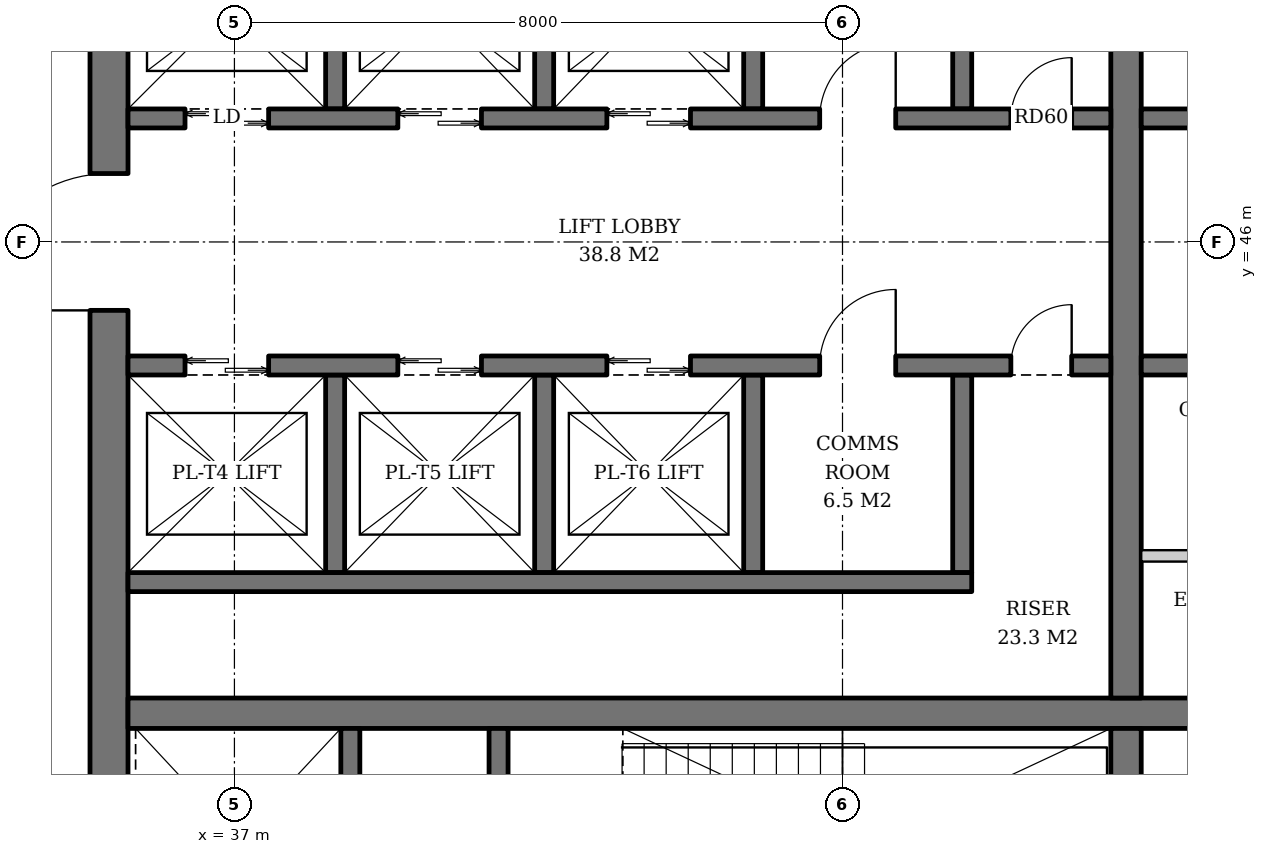
"""IFC4 building model, lengths in metres.
Left out: names, types, materials, properties, quantities, classifications, styles, units other than length and angle.
Written with IfcOpenShell. Run it as: python <this file> out.ifc"""

import sys

from ifc_helpers import new_model, si_unit, direction, frame, frame_2d, origin, place, context, subcontext, project, spatial, rectangle, extrude, element, fill, save


model = new_model("IFC4")
c1 = context("Model", 3, precision=1e-05, world=origin(), true_north=direction((0.0, 1.0)))
c2 = subcontext(c1, "Body", "Model", "MODEL_VIEW")
j1 = project(units=[si_unit("LENGTHUNIT", "METRE"), si_unit("PLANEANGLEUNIT", "RADIAN")], contexts=[c1])
p1 = place(None, origin())
s1 = spatial("IfcSite", under=j1, at=p1, CompositionType="ELEMENT")
p2 = place(p1, origin())
s2 = spatial("IfcBuilding", under=s1, at=p2, CompositionType="ELEMENT")
p3 = place(p2, frame((0.0, 0.0, 249.0)))
s3 = spatial("IfcBuildingStorey", under=s2, at=p3, CompositionType="ELEMENT", Elevation=249.0)
p4 = place(p3, frame((35.35, 36.6, 0.0), z_axis=(0.0, 0.0, 1.0), x_axis=(0.0, 1.0, 0.0)))
e1 = element("IfcWall", 1, at=p4, inside=s3, PredefinedType="SHEAR", context=c2, shape_type="SweptSolid", body=[
    extrude(rectangle(XDim=18.8, YDim=0.5, at=frame_2d((9.4, 0.0))), origin(), (0.0, 0.0, 1.0), 3.8),
])
p5 = place(p4, frame((8.5, 0.0, 0.0)))
e2 = element("IfcOpeningElement", 2, at=p5, cuts=e1, PredefinedType="OPENING", context=c2, shape_type="SweptSolid", body=[
    extrude(rectangle(XDim=1.8, YDim=2.4, at=frame_2d((0.9, 1.2))), frame((0.0, 0.26, 0.0), z_axis=(0.0, -1.0, 0.0), x_axis=(1.0, 0.0, 0.0)), (0.0, 0.0, 1.0), 0.52),
])
p6 = place(p3, frame((35.6, 39.8, 0.0), z_axis=(0.0, 0.0, 1.0), x_axis=(1.0, 0.0, 0.0)))
e3 = element("IfcWall", 3, at=p6, inside=s3, PredefinedType="SHEAR", context=c2, shape_type="SweptSolid", body=[
    extrude(rectangle(XDim=18.8, YDim=0.4, at=frame_2d((9.4, 0.0))), origin(), (0.0, 0.0, 1.0), 3.8),
])
p7 = place(p3, frame((48.73, 36.6, 0.0), z_axis=(0.0, 0.0, 1.0), x_axis=(0.0, 1.0, 0.0)))
e4 = element("IfcWall", 4, at=p7, inside=s3, PredefinedType="SHEAR", context=c2, shape_type="SweptSolid", body=[
    extrude(rectangle(XDim=3.0, YDim=0.4, at=frame_2d((1.5, 0.0))), origin(), (0.0, 0.0, 1.0), 3.8),
])
p8 = place(p3, frame((48.73, 40.0, 0.0), z_axis=(0.0, 0.0, 1.0), x_axis=(0.0, 1.0, 0.0)))
e5 = element("IfcWall", 5, at=p8, inside=s3, PredefinedType="SHEAR", context=c2, shape_type="SweptSolid", body=[
    extrude(rectangle(XDim=12.0, YDim=0.4, at=frame_2d((6.0, 0.0))), origin(), (0.0, 0.0, 1.0), 3.8),
])
p9 = place(p3, frame((38.525, 36.6, 0.0), z_axis=(0.0, 0.0, 1.0), x_axis=(0.0, 1.0, 0.0)))
e6 = element("IfcWall", 6, at=p9, inside=s3, PredefinedType="SHEAR", context=c2, shape_type="SweptSolid", body=[
    extrude(rectangle(XDim=3.0, YDim=0.25, at=frame_2d((1.5, 0.0))), origin(), (0.0, 0.0, 1.0), 3.8),
])
p10 = place(p9, frame((0.9, 0.0, 0.0)))
e7 = element("IfcOpeningElement", 7, at=p10, cuts=e6, PredefinedType="OPENING", context=c2, shape_type="SweptSolid", body=[
    extrude(rectangle(XDim=1.3, YDim=2.2, at=frame_2d((0.65, 1.1))), frame((0.0, 0.135, 0.0), z_axis=(0.0, -1.0, 0.0), x_axis=(1.0, 0.0, 0.0)), (0.0, 0.0, 1.0), 0.27),
])
p11 = place(p3, frame((40.475, 36.6, 0.0), z_axis=(0.0, 0.0, 1.0), x_axis=(0.0, 1.0, 0.0)))
e8 = element("IfcWall", 8, at=p11, inside=s3, PredefinedType="SHEAR", context=c2, shape_type="SweptSolid", body=[
    extrude(rectangle(XDim=3.0, YDim=0.25, at=frame_2d((1.5, 0.0))), origin(), (0.0, 0.0, 1.0), 3.8),
])
p12 = place(p11, frame((0.85, 0.0, 0.0)))
e9 = element("IfcOpeningElement", 9, at=p12, cuts=e8, PredefinedType="OPENING", context=c2, shape_type="SweptSolid", body=[
    extrude(rectangle(XDim=1.2, YDim=2.1, at=frame_2d((0.6, 1.05))), frame((0.0, 0.135, 0.0), z_axis=(0.0, -1.0, 0.0), x_axis=(1.0, 0.0, 0.0)), (0.0, 0.0, 1.0), 0.27),
])
for number, where, z_axis, x_axis in (
    (10, (38.325, 47.75, 0.0), (0.0, 0.0, 1.0), (0.0, 1.0, 0.0)),
    (11, (41.075, 47.75, 0.0), (0.0, 0.0, 1.0), (0.0, 1.0, 0.0)),
    (12, (43.825, 47.75, 0.0), (0.0, 0.0, 1.0), (0.0, 1.0, 0.0)),
    (13, (46.575, 47.75, 0.0), (0.0, 0.0, 1.0), (0.0, 1.0, 0.0)),
):
    element("IfcWall", number, at=place(p3, frame(where, z_axis=z_axis, x_axis=x_axis)), inside=s3, PredefinedType="SHEAR", context=c2, shape_type="SweptSolid", body=[
        extrude(rectangle(XDim=2.6, YDim=0.25, at=frame_2d((1.3, 0.0))), origin(), (0.0, 0.0, 1.0), 3.8),
    ])
p13 = place(p3, frame((35.6, 47.625, 0.0), z_axis=(0.0, 0.0, 1.0), x_axis=(1.0, 0.0, 0.0)))
e14 = element("IfcWall", 14, at=p13, inside=s3, PredefinedType="SHEAR", context=c2, shape_type="SweptSolid", body=[
    extrude(rectangle(XDim=12.93, YDim=0.25, at=frame_2d((6.465, 0.0))), origin(), (0.0, 0.0, 1.0), 3.8),
])
p14 = place(p13, frame((0.75, 0.0, 0.0)))
e15 = element("IfcOpeningElement", 15, at=p14, cuts=e14, PredefinedType="OPENING", context=c2, shape_type="SweptSolid", body=[
    extrude(rectangle(XDim=1.1, YDim=2.2, at=frame_2d((0.55, 1.1))), frame((0.0, 0.135, 0.0), z_axis=(0.0, -1.0, 0.0), x_axis=(1.0, 0.0, 0.0)), (0.0, 0.0, 1.0), 0.27),
])
p15 = place(p13, frame((3.55, 0.0, 0.0)))
e16 = element("IfcOpeningElement", 16, at=p15, cuts=e14, PredefinedType="OPENING", context=c2, shape_type="SweptSolid", body=[
    extrude(rectangle(XDim=1.1, YDim=2.2, at=frame_2d((0.55, 1.1))), frame((0.0, 0.135, 0.0), z_axis=(0.0, -1.0, 0.0), x_axis=(1.0, 0.0, 0.0)), (0.0, 0.0, 1.0), 0.27),
])
p16 = place(p13, frame((6.3, 0.0, 0.0)))
e17 = element("IfcOpeningElement", 17, at=p16, cuts=e14, PredefinedType="OPENING", context=c2, shape_type="SweptSolid", body=[
    extrude(rectangle(XDim=1.1, YDim=2.2, at=frame_2d((0.55, 1.1))), frame((0.0, 0.135, 0.0), z_axis=(0.0, -1.0, 0.0), x_axis=(1.0, 0.0, 0.0)), (0.0, 0.0, 1.0), 0.27),
])
p17 = place(p13, frame((9.1, 0.0, 0.0)))
e18 = element("IfcOpeningElement", 18, at=p17, cuts=e14, PredefinedType="OPENING", context=c2, shape_type="SweptSolid", body=[
    extrude(rectangle(XDim=1.0, YDim=2.1, at=frame_2d((0.5, 1.05))), frame((0.0, 0.135, 0.0), z_axis=(0.0, -1.0, 0.0), x_axis=(1.0, 0.0, 0.0)), (0.0, 0.0, 1.0), 0.27),
])
p18 = place(p13, frame((11.615, 0.0, 0.0)))
e19 = element("IfcOpeningElement", 19, at=p18, cuts=e14, PredefinedType="OPENING", context=c2, shape_type="SweptSolid", body=[
    extrude(rectangle(XDim=0.8, YDim=2.0, at=frame_2d((0.4, 1.0))), frame((0.0, 0.135, 0.0), z_axis=(0.0, -1.0, 0.0), x_axis=(1.0, 0.0, 0.0)), (0.0, 0.0, 1.0), 0.27),
])
for number, where, z_axis, x_axis in (
    (20, (38.325, 44.25, 0.0), (0.0, 0.0, 1.0), (0.0, -1.0, 0.0)),
    (21, (41.075, 44.25, 0.0), (0.0, 0.0, 1.0), (0.0, -1.0, 0.0)),
    (22, (43.825, 44.25, 0.0), (0.0, 0.0, 1.0), (0.0, -1.0, 0.0)),
    (23, (46.575, 44.25, 0.0), (0.0, 0.0, 1.0), (0.0, -1.0, 0.0)),
):
    element("IfcWall", number, at=place(p3, frame(where, z_axis=z_axis, x_axis=x_axis)), inside=s3, PredefinedType="SHEAR", context=c2, shape_type="SweptSolid", body=[
        extrude(rectangle(XDim=2.6, YDim=0.25, at=frame_2d((1.3, 0.0))), origin(), (0.0, 0.0, 1.0), 3.8),
    ])
p19 = place(p3, frame((35.6, 41.525, 0.0), z_axis=(0.0, 0.0, 1.0), x_axis=(1.0, 0.0, 0.0)))
e24 = element("IfcWall", 24, at=p19, inside=s3, PredefinedType="SHEAR", context=c2, shape_type="SweptSolid", body=[
    extrude(rectangle(XDim=11.1, YDim=0.25, at=frame_2d((5.55, 0.0))), origin(), (0.0, 0.0, 1.0), 3.8),
])
p20 = place(p3, frame((35.6, 44.375, 0.0), z_axis=(0.0, 0.0, 1.0), x_axis=(1.0, 0.0, 0.0)))
e25 = element("IfcWall", 25, at=p20, inside=s3, PredefinedType="SHEAR", context=c2, shape_type="SweptSolid", body=[
    extrude(rectangle(XDim=12.93, YDim=0.25, at=frame_2d((6.465, 0.0))), origin(), (0.0, 0.0, 1.0), 3.8),
])
p21 = place(p20, frame((0.75, 0.0, 0.0)))
e26 = element("IfcOpeningElement", 26, at=p21, cuts=e25, PredefinedType="OPENING", context=c2, shape_type="SweptSolid", body=[
    extrude(rectangle(XDim=1.1, YDim=2.2, at=frame_2d((0.55, 1.1))), frame((0.0, 0.135, 0.0), z_axis=(0.0, -1.0, 0.0), x_axis=(1.0, 0.0, 0.0)), (0.0, 0.0, 1.0), 0.27),
])
p22 = place(p20, frame((3.55, 0.0, 0.0)))
e27 = element("IfcOpeningElement", 27, at=p22, cuts=e25, PredefinedType="OPENING", context=c2, shape_type="SweptSolid", body=[
    extrude(rectangle(XDim=1.1, YDim=2.2, at=frame_2d((0.55, 1.1))), frame((0.0, 0.135, 0.0), z_axis=(0.0, -1.0, 0.0), x_axis=(1.0, 0.0, 0.0)), (0.0, 0.0, 1.0), 0.27),
])
p23 = place(p20, frame((6.3, 0.0, 0.0)))
e28 = element("IfcOpeningElement", 28, at=p23, cuts=e25, PredefinedType="OPENING", context=c2, shape_type="SweptSolid", body=[
    extrude(rectangle(XDim=1.1, YDim=2.2, at=frame_2d((0.55, 1.1))), frame((0.0, 0.135, 0.0), z_axis=(0.0, -1.0, 0.0), x_axis=(1.0, 0.0, 0.0)), (0.0, 0.0, 1.0), 0.27),
])
p24 = place(p20, frame((9.1, 0.0, 0.0)))
e29 = element("IfcOpeningElement", 29, at=p24, cuts=e25, PredefinedType="OPENING", context=c2, shape_type="SweptSolid", body=[
    extrude(rectangle(XDim=1.0, YDim=2.1, at=frame_2d((0.5, 1.05))), frame((0.0, 0.135, 0.0), z_axis=(0.0, -1.0, 0.0), x_axis=(1.0, 0.0, 0.0)), (0.0, 0.0, 1.0), 0.27),
])
p25 = place(p20, frame((11.615, 0.0, 0.0)))
e30 = element("IfcOpeningElement", 30, at=p25, cuts=e25, PredefinedType="OPENING", context=c2, shape_type="SweptSolid", body=[
    extrude(rectangle(XDim=0.8, YDim=2.0, at=frame_2d((0.4, 1.0))), frame((0.0, 0.135, 0.0), z_axis=(0.0, -1.0, 0.0), x_axis=(1.0, 0.0, 0.0)), (0.0, 0.0, 1.0), 0.27),
])
p26 = place(p3, frame((48.93, 47.625, 0.0), z_axis=(0.0, 0.0, 1.0), x_axis=(1.0, 0.0, 0.0)))
e31 = element("IfcWall", 31, at=p26, inside=s3, PredefinedType="SHEAR", context=c2, shape_type="SweptSolid", body=[
    extrude(rectangle(XDim=5.47, YDim=0.25, at=frame_2d((2.735, 0.0))), origin(), (0.0, 0.0, 1.0), 3.8),
])
p27 = place(p26, frame((0.78, 0.0, 0.0)))
e32 = element("IfcOpeningElement", 32, at=p27, cuts=e31, PredefinedType="OPENING", context=c2, shape_type="SweptSolid", body=[
    extrude(rectangle(XDim=1.0, YDim=2.1, at=frame_2d((0.5, 1.05))), frame((0.0, 0.135, 0.0), z_axis=(0.0, -1.0, 0.0), x_axis=(1.0, 0.0, 0.0)), (0.0, 0.0, 1.0), 0.27),
])
p28 = place(p26, frame((3.64, 0.0, 0.0)))
e33 = element("IfcOpeningElement", 33, at=p28, cuts=e31, PredefinedType="OPENING", context=c2, shape_type="SweptSolid", body=[
    extrude(rectangle(XDim=1.0, YDim=2.1, at=frame_2d((0.5, 1.05))), frame((0.0, 0.135, 0.0), z_axis=(0.0, -1.0, 0.0), x_axis=(1.0, 0.0, 0.0)), (0.0, 0.0, 1.0), 0.27),
])
p29 = place(p3, frame((48.93, 44.375, 0.0), z_axis=(0.0, 0.0, 1.0), x_axis=(1.0, 0.0, 0.0)))
e34 = element("IfcWall", 34, at=p29, inside=s3, PredefinedType="SHEAR", context=c2, shape_type="SweptSolid", body=[
    extrude(rectangle(XDim=5.47, YDim=0.25, at=frame_2d((2.735, 0.0))), origin(), (0.0, 0.0, 1.0), 3.8),
])
p30 = place(p29, frame((0.78, 0.0, 0.0)))
e35 = element("IfcOpeningElement", 35, at=p30, cuts=e34, PredefinedType="OPENING", context=c2, shape_type="SweptSolid", body=[
    extrude(rectangle(XDim=1.0, YDim=2.1, at=frame_2d((0.5, 1.05))), frame((0.0, 0.135, 0.0), z_axis=(0.0, -1.0, 0.0), x_axis=(1.0, 0.0, 0.0)), (0.0, 0.0, 1.0), 0.27),
])
p31 = place(p29, frame((3.64, 0.0, 0.0)))
e36 = element("IfcOpeningElement", 36, at=p31, cuts=e34, PredefinedType="OPENING", context=c2, shape_type="SweptSolid", body=[
    extrude(rectangle(XDim=1.0, YDim=2.1, at=frame_2d((0.5, 1.05))), frame((0.0, 0.135, 0.0), z_axis=(0.0, -1.0, 0.0), x_axis=(1.0, 0.0, 0.0)), (0.0, 0.0, 1.0), 0.27),
])
p32 = place(p3, frame((48.93, 41.87, 0.0), z_axis=(0.0, 0.0, 1.0), x_axis=(1.0, 0.0, 0.0)))
e37 = element("IfcWall", 37, at=p32, inside=s3, PredefinedType="SOLIDWALL", context=c2, shape_type="SweptSolid", body=[
    extrude(rectangle(XDim=2.56, YDim=0.15, at=frame_2d((1.28, 0.0))), origin(), (0.0, 0.0, 1.0), 3.62),
])
p33 = place(p32, frame((0.78, 0.0, 0.0)))
e38 = element("IfcOpeningElement", 38, at=p33, cuts=e37, PredefinedType="OPENING", context=c2, shape_type="SweptSolid", body=[
    extrude(rectangle(XDim=1.0, YDim=2.1, at=frame_2d((0.5, 1.05))), frame((0.0, 0.085, 0.0), z_axis=(0.0, -1.0, 0.0), x_axis=(1.0, 0.0, 0.0)), (0.0, 0.0, 1.0), 0.17),
])
p34 = place(p14, origin())
e39 = element("IfcDoor", 39, at=p34, inside=s3, OperationType="DOUBLE_DOOR_SLIDING", PredefinedType="DOOR", context=c2, shape_type="SweptSolid", body=[
    extrude(rectangle(XDim=1.1, YDim=2.2, at=frame_2d((0.55, 1.1))), frame((0.0, 0.025, 0.0), z_axis=(0.0, -1.0, 0.0), x_axis=(1.0, 0.0, 0.0)), (0.0, 0.0, 1.0), 0.05),
])
fill(e15, e39)
p35 = place(p15, origin())
e40 = element("IfcDoor", 40, at=p35, inside=s3, OperationType="DOUBLE_DOOR_SLIDING", PredefinedType="DOOR", context=c2, shape_type="SweptSolid", body=[
    extrude(rectangle(XDim=1.1, YDim=2.2, at=frame_2d((0.55, 1.1))), frame((0.0, 0.025, 0.0), z_axis=(0.0, -1.0, 0.0), x_axis=(1.0, 0.0, 0.0)), (0.0, 0.0, 1.0), 0.05),
])
fill(e16, e40)
p36 = place(p16, origin())
e41 = element("IfcDoor", 41, at=p36, inside=s3, OperationType="DOUBLE_DOOR_SLIDING", PredefinedType="DOOR", context=c2, shape_type="SweptSolid", body=[
    extrude(rectangle(XDim=1.1, YDim=2.2, at=frame_2d((0.55, 1.1))), frame((0.0, 0.025, 0.0), z_axis=(0.0, -1.0, 0.0), x_axis=(1.0, 0.0, 0.0)), (0.0, 0.0, 1.0), 0.05),
])
fill(e17, e41)
p37 = place(p17, origin())
e42 = element("IfcDoor", 42, at=p37, inside=s3, OperationType="SINGLE_SWING_RIGHT", PredefinedType="DOOR", context=c2, shape_type="SweptSolid", body=[
    extrude(rectangle(XDim=1.0, YDim=2.1, at=frame_2d((0.5, 1.05))), frame((0.0, 0.025, 0.0), z_axis=(0.0, -1.0, 0.0), x_axis=(1.0, 0.0, 0.0)), (0.0, 0.0, 1.0), 0.05),
])
fill(e18, e42)
p38 = place(p18, origin())
e43 = element("IfcDoor", 43, at=p38, inside=s3, OperationType="SINGLE_SWING_RIGHT", PredefinedType="DOOR", context=c2, shape_type="SweptSolid", body=[
    extrude(rectangle(XDim=0.8, YDim=2.0, at=frame_2d((0.4, 1.0))), frame((0.0, 0.025, 0.0), z_axis=(0.0, -1.0, 0.0), x_axis=(1.0, 0.0, 0.0)), (0.0, 0.0, 1.0), 0.05),
])
fill(e19, e43)
p39 = place(p21, origin())
e44 = element("IfcDoor", 44, at=p39, inside=s3, OperationType="DOUBLE_DOOR_SLIDING", PredefinedType="DOOR", context=c2, shape_type="SweptSolid", body=[
    extrude(rectangle(XDim=1.1, YDim=2.2, at=frame_2d((0.55, 1.1))), frame((0.0, 0.025, 0.0), z_axis=(0.0, -1.0, 0.0), x_axis=(1.0, 0.0, 0.0)), (0.0, 0.0, 1.0), 0.05),
])
fill(e26, e44)
p40 = place(p22, origin())
e45 = element("IfcDoor", 45, at=p40, inside=s3, OperationType="DOUBLE_DOOR_SLIDING", PredefinedType="DOOR", context=c2, shape_type="SweptSolid", body=[
    extrude(rectangle(XDim=1.1, YDim=2.2, at=frame_2d((0.55, 1.1))), frame((0.0, 0.025, 0.0), z_axis=(0.0, -1.0, 0.0), x_axis=(1.0, 0.0, 0.0)), (0.0, 0.0, 1.0), 0.05),
])
fill(e27, e45)
p41 = place(p23, origin())
e46 = element("IfcDoor", 46, at=p41, inside=s3, OperationType="DOUBLE_DOOR_SLIDING", PredefinedType="DOOR", context=c2, shape_type="SweptSolid", body=[
    extrude(rectangle(XDim=1.1, YDim=2.2, at=frame_2d((0.55, 1.1))), frame((0.0, 0.025, 0.0), z_axis=(0.0, -1.0, 0.0), x_axis=(1.0, 0.0, 0.0)), (0.0, 0.0, 1.0), 0.05),
])
fill(e28, e46)
p42 = place(p24, origin())
e47 = element("IfcDoor", 47, at=p42, inside=s3, OperationType="SINGLE_SWING_RIGHT", PredefinedType="DOOR", context=c2, shape_type="SweptSolid", body=[
    extrude(rectangle(XDim=1.0, YDim=2.1, at=frame_2d((0.5, 1.05))), frame((0.0, 0.025, 0.0), z_axis=(0.0, -1.0, 0.0), x_axis=(1.0, 0.0, 0.0)), (0.0, 0.0, 1.0), 0.05),
])
fill(e29, e47)
p43 = place(p25, origin())
e48 = element("IfcDoor", 48, at=p43, inside=s3, OperationType="SINGLE_SWING_RIGHT", PredefinedType="DOOR", context=c2, shape_type="SweptSolid", body=[
    extrude(rectangle(XDim=0.8, YDim=2.0, at=frame_2d((0.4, 1.0))), frame((0.0, 0.025, 0.0), z_axis=(0.0, -1.0, 0.0), x_axis=(1.0, 0.0, 0.0)), (0.0, 0.0, 1.0), 0.05),
])
fill(e30, e48)
p44 = place(p5, origin())
e49 = element("IfcDoor", 49, at=p44, inside=s3, OperationType="DOUBLE_DOOR_SINGLE_SWING", PredefinedType="DOOR", context=c2, shape_type="SweptSolid", body=[
    extrude(rectangle(XDim=1.8, YDim=2.4, at=frame_2d((0.9, 1.2))), frame((0.0, 0.025, 0.0), z_axis=(0.0, -1.0, 0.0), x_axis=(1.0, 0.0, 0.0)), (0.0, 0.0, 1.0), 0.05),
])
fill(e2, e49)
save(model, sys.argv[1])
